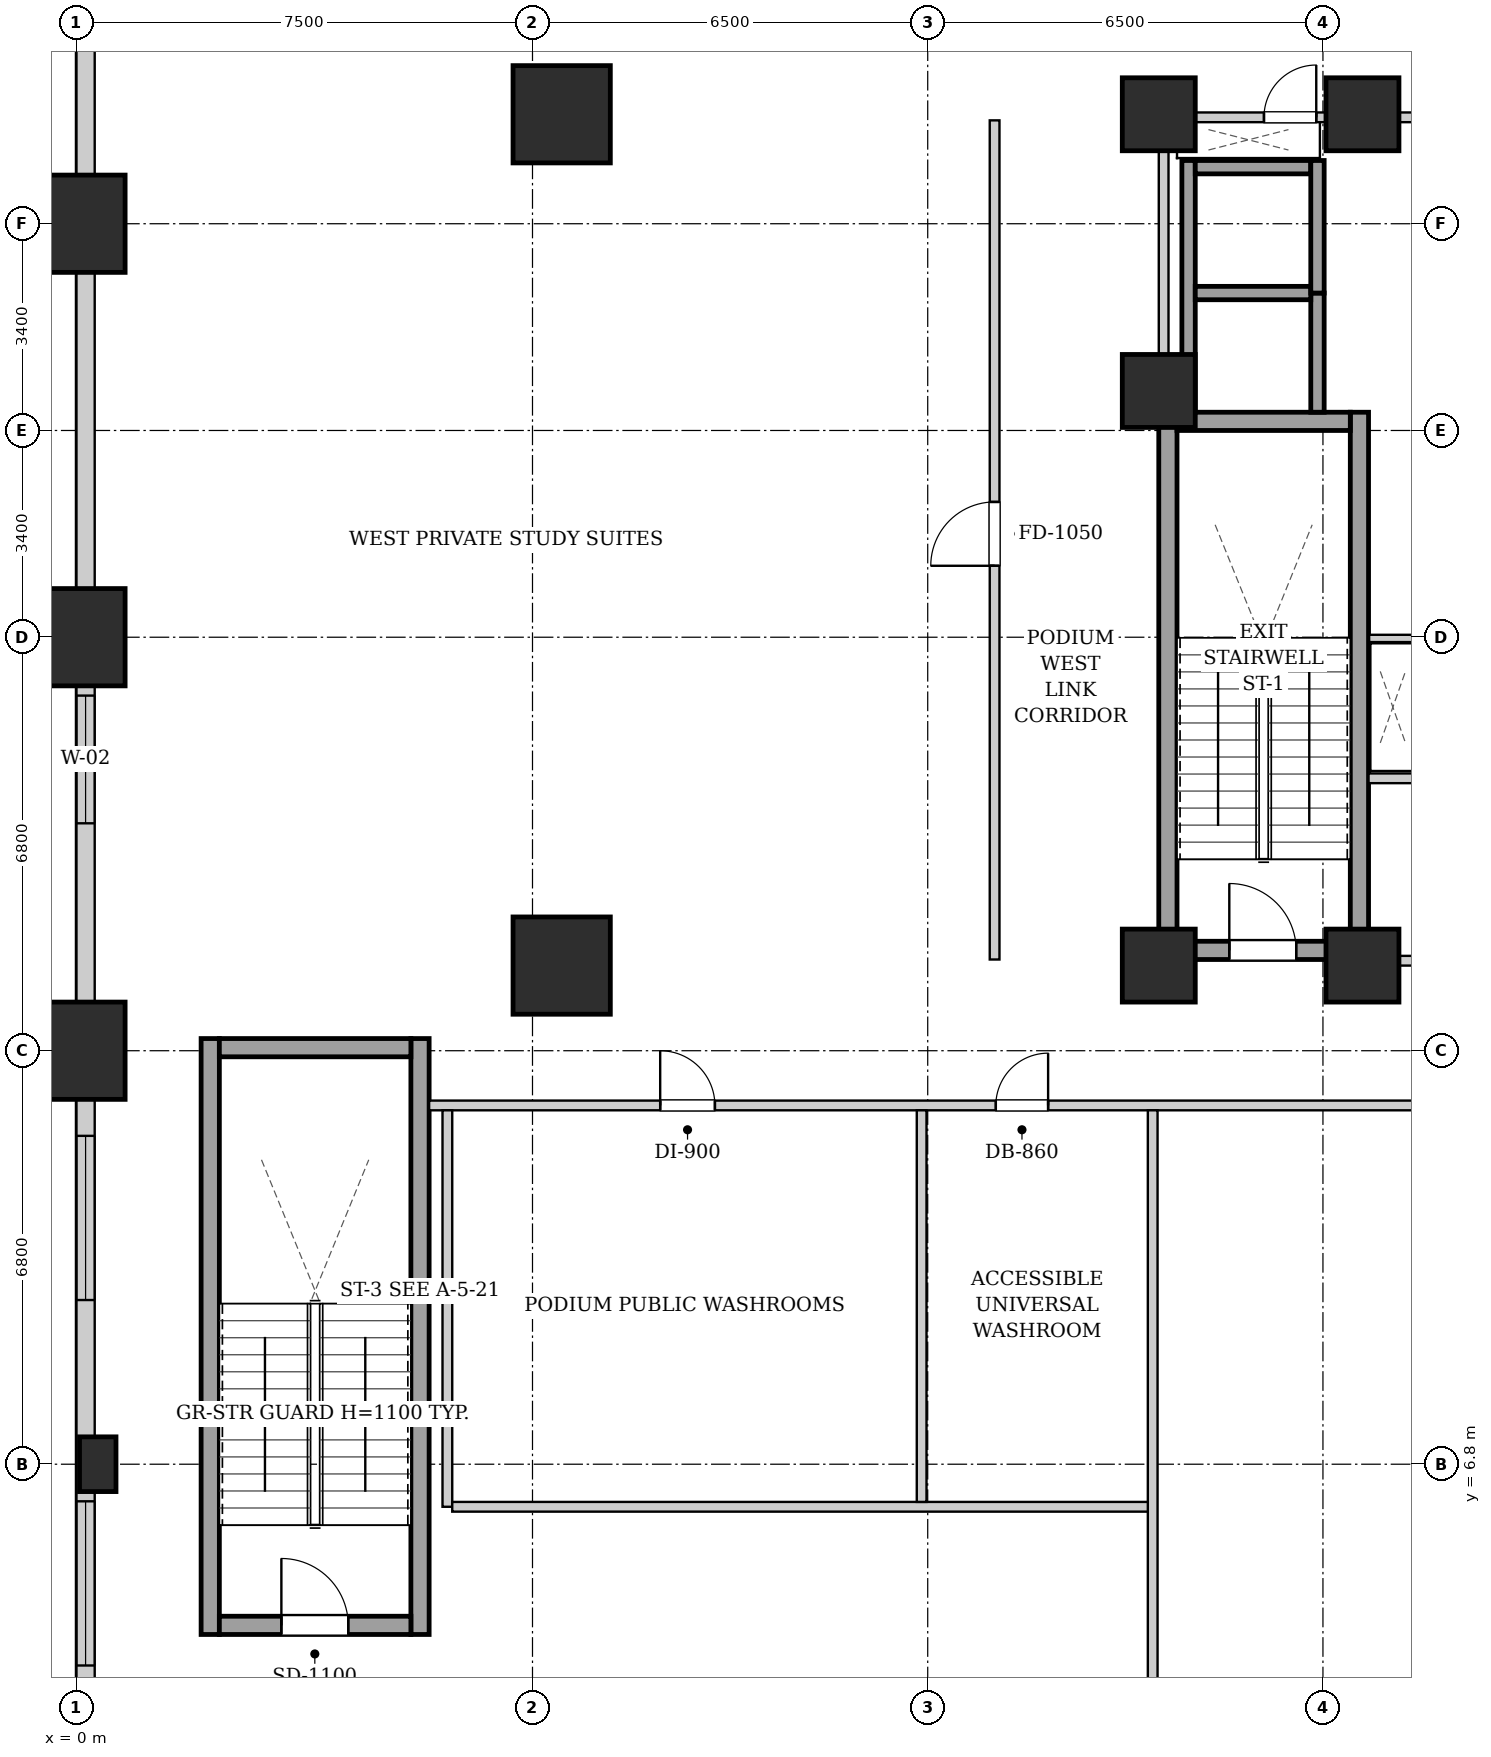
"""IFC4 building model, lengths in metres.
Left out: names, types, materials, properties, quantities, classifications, styles, units other than length and angle.
Written with IfcOpenShell. Run it as: python <this file> out.ifc"""

import sys

from ifc_helpers import new_model, si_unit, direction, frame, frame_2d, origin, origin_2d, place, context, subcontext, project, spatial, rectangle, extrude, element, fill, save


model = new_model("IFC4")
c1 = context("Model", 3, precision=1e-05, world=origin(), true_north=direction((0.0, 1.0)))
c2 = subcontext(c1, "Body", "Model", "MODEL_VIEW")
j1 = project(units=[si_unit("LENGTHUNIT", "METRE"), si_unit("PLANEANGLEUNIT", "RADIAN")], contexts=[c1])
p1 = place(None, origin())
s1 = spatial("IfcSite", under=j1, at=p1, CompositionType="ELEMENT")
p2 = place(p1, origin())
s2 = spatial("IfcBuilding", under=s1, at=p2, CompositionType="ELEMENT")
p3 = place(p2, frame((0.0, 0.0, 11.2)))
s3 = spatial("IfcBuildingStorey", under=s2, at=p3, CompositionType="ELEMENT", Elevation=11.2)
for number, where, z_axis, x_axis in (
    (1, (0.0, 13.6, 0.0), (0.0, 0.0, 1.0), (1.0, 0.0, 0.0)),
    (2, (0.0, 20.4, 0.0), (0.0, 0.0, 1.0), (1.0, 0.0, 0.0)),
    (3, (0.0, 27.2, 0.0), (0.0, 0.0, 1.0), (1.0, 0.0, 0.0)),
    (4, (7.98, 15.0, 0.0), (0.0, 0.0, 1.0), (1.0, 0.0, 0.0)),
    (5, (7.98, 29.0, 0.0), (0.0, 0.0, 1.0), (1.0, 0.0, 0.0)),
):
    element("IfcColumn", number, at=place(p3, frame(where, z_axis=z_axis, x_axis=x_axis)), inside=s3, PredefinedType="COLUMN", context=c2, shape_type="SweptSolid", body=[
        extrude(rectangle(XDim=1.6, YDim=1.6, at=origin_2d()), origin(), (0.0, 0.0, 1.0), 4.8),
    ])
for number, where, z_axis, x_axis in (
    (6, (17.8, 15.0, 0.0), (0.0, 0.0, 1.0), (1.0, 0.0, 0.0)),
    (7, (21.15, 15.0, 0.0), (0.0, 0.0, 1.0), (1.0, 0.0, 0.0)),
    (8, (17.8, 29.0, 0.0), (0.0, 0.0, 1.0), (1.0, 0.0, 0.0)),
    (9, (21.15, 29.0, 0.0), (0.0, 0.0, 1.0), (1.0, 0.0, 0.0)),
    (10, (17.8, 24.45, 0.0), (0.0, 0.0, 1.0), (1.0, 0.0, 0.0)),
):
    element("IfcColumn", number, at=place(p3, frame(where, z_axis=z_axis, x_axis=x_axis)), inside=s3, PredefinedType="COLUMN", context=c2, shape_type="SweptSolid", body=[
        extrude(rectangle(XDim=1.2, YDim=1.2, at=origin_2d()), origin(), (0.0, 0.0, 1.0), 4.8),
    ])
p4 = place(p3, frame((0.35, 6.8, 0.0), z_axis=(0.0, 0.0, 1.0), x_axis=(1.0, 0.0, 0.0)))
e11 = element("IfcColumn", 11, at=p4, inside=s3, PredefinedType="PILASTER", context=c2, shape_type="SweptSolid", body=[
    extrude(rectangle(XDim=0.6, YDim=0.9, at=origin_2d()), origin(), (0.0, 0.0, 1.0), 4.8),
])
p5 = place(p3, frame((0.15, 0.16, 0.0), z_axis=(0.0, 0.0, 1.0), x_axis=(0.0, 1.0, 0.0)))
e12 = element("IfcWall", 12, at=p5, inside=s3, PredefinedType="SOLIDWALL", context=c2, shape_type="SweptSolid", body=[
    extrude(rectangle(XDim=47.28, YDim=0.3, at=frame_2d((23.64, 0.0))), origin(), (0.0, 0.0, 1.0), 3.365),
])
p6 = place(p5, frame((3.33, 0.0, 0.9)))
e13 = element("IfcOpeningElement", 13, at=p6, cuts=e12, PredefinedType="OPENING", context=c2, shape_type="SweptSolid", body=[
    extrude(rectangle(XDim=2.7, YDim=2.1, at=frame_2d((1.35, 1.05))), frame((0.0, 0.16, 0.0), z_axis=(0.0, -1.0, 0.0), x_axis=(1.0, 0.0, 0.0)), (0.0, 0.0, 1.0), 0.32),
])
p7 = place(p5, frame((9.34, 0.0, 0.9)))
e14 = element("IfcOpeningElement", 14, at=p7, cuts=e12, PredefinedType="OPENING", context=c2, shape_type="SweptSolid", body=[
    extrude(rectangle(XDim=2.7, YDim=2.1, at=frame_2d((1.35, 1.05))), frame((0.0, 0.16, 0.0), z_axis=(0.0, -1.0, 0.0), x_axis=(1.0, 0.0, 0.0)), (0.0, 0.0, 1.0), 0.32),
])
p8 = place(p5, frame((17.18, 0.0, 0.85)))
e15 = element("IfcOpeningElement", 15, at=p8, cuts=e12, PredefinedType="OPENING", context=c2, shape_type="SweptSolid", body=[
    extrude(rectangle(XDim=2.1, YDim=1.85, at=frame_2d((1.05, 0.925))), frame((0.0, 0.16, 0.0), z_axis=(0.0, -1.0, 0.0), x_axis=(1.0, 0.0, 0.0)), (0.0, 0.0, 1.0), 0.32),
])
p9 = place(p5, frame((36.5, 0.0, 0.9)))
e16 = element("IfcOpeningElement", 16, at=p9, cuts=e12, PredefinedType="OPENING", context=c2, shape_type="SweptSolid", body=[
    extrude(rectangle(XDim=2.7, YDim=2.1, at=frame_2d((1.35, 1.05))), frame((0.0, 0.16, 0.0), z_axis=(0.0, -1.0, 0.0), x_axis=(1.0, 0.0, 0.0)), (0.0, 0.0, 1.0), 0.32),
])
p10 = place(p5, frame((43.0, 0.0, 0.9)))
e17 = element("IfcOpeningElement", 17, at=p10, cuts=e12, PredefinedType="OPENING", context=c2, shape_type="SweptSolid", body=[
    extrude(rectangle(XDim=2.7, YDim=2.1, at=frame_2d((1.35, 1.05))), frame((0.0, 0.16, 0.0), z_axis=(0.0, -1.0, 0.0), x_axis=(1.0, 0.0, 0.0)), (0.0, 0.0, 1.0), 0.32),
])
for number, where, z_axis, x_axis in (
    (18, (17.95, 15.1, 0.0), (0.0, 0.0, 1.0), (0.0, 1.0, 0.0)),
    (19, (21.1, 15.1, 0.0), (0.0, 0.0, 1.0), (0.0, 1.0, 0.0)),
):
    element("IfcWall", number, at=place(p3, frame(where, z_axis=z_axis, x_axis=x_axis)), inside=s3, PredefinedType="SHEAR", context=c2, shape_type="SweptSolid", body=[
        extrude(rectangle(XDim=9.0, YDim=0.3, at=frame_2d((4.5, 0.0))), origin(), (0.0, 0.0, 1.0), 4.48),
    ])
p11 = place(p3, frame((18.1, 23.95, 0.0), z_axis=(0.0, 0.0, 1.0), x_axis=(1.0, 0.0, 0.0)))
e20 = element("IfcWall", 20, at=p11, inside=s3, PredefinedType="SHEAR", context=c2, shape_type="SweptSolid", body=[
    extrude(rectangle(XDim=2.85, YDim=0.3, at=frame_2d((1.425, 0.0))), origin(), (0.0, 0.0, 1.0), 4.48),
])
p12 = place(p3, frame((18.1, 15.25, 0.0), z_axis=(0.0, 0.0, 1.0), x_axis=(1.0, 0.0, 0.0)))
e21 = element("IfcWall", 21, at=p12, inside=s3, PredefinedType="SHEAR", context=c2, shape_type="SweptSolid", body=[
    extrude(rectangle(XDim=2.85, YDim=0.3, at=frame_2d((1.425, 0.0))), origin(), (0.0, 0.0, 1.0), 4.48),
])
p13 = place(p12, frame((0.86, 0.0, 0.0)))
e22 = element("IfcOpeningElement", 22, at=p13, cuts=e21, PredefinedType="OPENING", context=c2, shape_type="SweptSolid", body=[
    extrude(rectangle(XDim=1.1, YDim=2.05, at=frame_2d((0.55, 1.025))), frame((0.0, 0.16, 0.0), z_axis=(0.0, -1.0, 0.0), x_axis=(1.0, 0.0, 0.0)), (0.0, 0.0, 1.0), 0.32),
])
for number, where, z_axis, x_axis in (
    (23, (2.2, 4.0, 0.0), (0.0, 0.0, 1.0), (0.0, 1.0, 0.0)),
    (24, (5.65, 4.0, 0.0), (0.0, 0.0, 1.0), (0.0, 1.0, 0.0)),
):
    element("IfcWall", number, at=place(p3, frame(where, z_axis=z_axis, x_axis=x_axis)), inside=s3, PredefinedType="SHEAR", context=c2, shape_type="SweptSolid", body=[
        extrude(rectangle(XDim=9.8, YDim=0.3, at=frame_2d((4.9, 0.0))), origin(), (0.0, 0.0, 1.0), 4.48),
    ])
p14 = place(p3, frame((2.35, 13.65, 0.0), z_axis=(0.0, 0.0, 1.0), x_axis=(1.0, 0.0, 0.0)))
e25 = element("IfcWall", 25, at=p14, inside=s3, PredefinedType="SHEAR", context=c2, shape_type="SweptSolid", body=[
    extrude(rectangle(XDim=3.15, YDim=0.3, at=frame_2d((1.575, 0.0))), origin(), (0.0, 0.0, 1.0), 4.48),
])
p15 = place(p3, frame((2.35, 4.15, 0.0), z_axis=(0.0, 0.0, 1.0), x_axis=(1.0, 0.0, 0.0)))
e26 = element("IfcWall", 26, at=p15, inside=s3, PredefinedType="SHEAR", context=c2, shape_type="SweptSolid", body=[
    extrude(rectangle(XDim=3.15, YDim=0.3, at=frame_2d((1.575, 0.0))), origin(), (0.0, 0.0, 1.0), 4.48),
])
p16 = place(p15, frame((1.02, 0.0, 0.0)))
e27 = element("IfcOpeningElement", 27, at=p16, cuts=e26, PredefinedType="OPENING", context=c2, shape_type="SweptSolid", body=[
    extrude(rectangle(XDim=1.1, YDim=2.05, at=frame_2d((0.55, 1.025))), frame((0.0, 0.16, 0.0), z_axis=(0.0, -1.0, 0.0), x_axis=(1.0, 0.0, 0.0)), (0.0, 0.0, 1.0), 0.32),
])
p17 = place(p3, frame((18.29, 24.1, 0.0), z_axis=(0.0, 0.0, 1.0), x_axis=(0.0, 1.0, 0.0)))
e28 = element("IfcWall", 28, at=p17, inside=s3, PredefinedType="SHEAR", context=c2, shape_type="SweptSolid", body=[
    extrude(rectangle(XDim=4.14, YDim=0.22, at=frame_2d((2.07, 0.0))), origin(), (0.0, 0.0, 1.0), 4.48),
])
p18 = place(p3, frame((20.41, 24.1, 0.0), z_axis=(0.0, 0.0, 1.0), x_axis=(0.0, 1.0, 0.0)))
e29 = element("IfcWall", 29, at=p18, inside=s3, PredefinedType="SHEAR", context=c2, shape_type="SweptSolid", body=[
    extrude(rectangle(XDim=1.96, YDim=0.22, at=frame_2d((0.98, 0.0))), origin(), (0.0, 0.0, 1.0), 4.48),
])
for number, where, z_axis, x_axis in (
    (30, (18.4, 26.06, 0.0), (0.0, 0.0, 1.0), (1.0, 0.0, 0.0)),
    (31, (18.4, 28.13, 0.0), (0.0, 0.0, 1.0), (1.0, 0.0, 0.0)),
):
    element("IfcWall", number, at=place(p3, frame(where, z_axis=z_axis, x_axis=x_axis)), inside=s3, PredefinedType="SHEAR", context=c2, shape_type="SweptSolid", body=[
        extrude(rectangle(XDim=1.9, YDim=0.22, at=frame_2d((0.95, 0.0))), origin(), (0.0, 0.0, 1.0), 4.48),
    ])
p19 = place(p3, frame((20.41, 26.06, 0.0), z_axis=(0.0, 0.0, 1.0), x_axis=(0.0, 1.0, 0.0)))
e32 = element("IfcWall", 32, at=p19, inside=s3, PredefinedType="SHEAR", context=c2, shape_type="SweptSolid", body=[
    extrude(rectangle(XDim=2.18, YDim=0.22, at=frame_2d((1.09, 0.0))), origin(), (0.0, 0.0, 1.0), 4.48),
])
p20 = place(p3, frame((21.25, 15.08, 0.0), z_axis=(0.0, 0.0, 1.0), x_axis=(1.0, 0.0, 0.0)))
e33 = element("IfcWall", 33, at=p20, inside=s3, PredefinedType="PARTITIONING", context=c2, shape_type="SweptSolid", body=[
    extrude(rectangle(XDim=8.5, YDim=0.16, at=frame_2d((4.25, 0.0))), origin(), (0.0, 0.0, 1.0), 4.48),
])
p21 = place(p20, frame((3.725, 0.0, 0.0)))
e34 = element("IfcOpeningElement", 34, at=p21, cuts=e33, PredefinedType="OPENING", context=c2, shape_type="SweptSolid", body=[
    extrude(rectangle(XDim=1.05, YDim=2.05, at=frame_2d((0.525, 1.025))), frame((0.0, 0.09, 0.0), z_axis=(0.0, -1.0, 0.0), x_axis=(1.0, 0.0, 0.0)), (0.0, 0.0, 1.0), 0.18),
])
p22 = place(p3, frame((21.25, 18.08, 0.0), z_axis=(0.0, 0.0, 1.0), x_axis=(1.0, 0.0, 0.0)))
e35 = element("IfcWall", 35, at=p22, inside=s3, PredefinedType="PARTITIONING", context=c2, shape_type="SweptSolid", body=[
    extrude(rectangle(XDim=1.1, YDim=0.16, at=frame_2d((0.55, 0.0))), origin(), (0.0, 0.0, 1.0), 4.48),
])
p23 = place(p3, frame((17.88, 24.12, 0.0), z_axis=(0.0, 0.0, 1.0), x_axis=(0.0, 1.0, 0.0)))
e36 = element("IfcWall", 36, at=p23, inside=s3, PredefinedType="PARTITIONING", context=c2, shape_type="SweptSolid", body=[
    extrude(rectangle(XDim=4.76, YDim=0.16, at=frame_2d((2.38, 0.0))), origin(), (0.0, 0.0, 1.0), 4.48),
])
p24 = place(p3, frame((17.96, 28.95, 0.0), z_axis=(0.0, 0.0, 1.0), x_axis=(1.0, 0.0, 0.0)))
e37 = element("IfcWall", 37, at=p24, inside=s3, PredefinedType="PARTITIONING", context=c2, shape_type="SweptSolid", body=[
    extrude(rectangle(XDim=4.29, YDim=0.16, at=frame_2d((2.145, 0.0))), origin(), (0.0, 0.0, 1.0), 4.48),
])
p25 = place(p24, frame((1.57, 0.0, 0.0)))
e38 = element("IfcOpeningElement", 38, at=p25, cuts=e37, PredefinedType="OPENING", context=c2, shape_type="SweptSolid", body=[
    extrude(rectangle(XDim=0.86, YDim=2.05, at=frame_2d((0.43, 1.025))), frame((0.0, 0.09, 0.0), z_axis=(0.0, -1.0, 0.0), x_axis=(1.0, 0.0, 0.0)), (0.0, 0.0, 1.0), 0.18),
])
p26 = place(p3, frame((22.28, 20.38, 0.0), z_axis=(0.0, 0.0, 1.0), x_axis=(-1.0, 0.0, 0.0)))
e39 = element("IfcWall", 39, at=p26, inside=s3, PredefinedType="PARTITIONING", context=c2, shape_type="SweptSolid", body=[
    extrude(rectangle(XDim=1.02, YDim=0.12, at=frame_2d((0.51, 0.0))), origin(), (0.0, 0.0, 1.0), 4.48),
])
p27 = place(p3, frame((5.8, 12.7, 0.0), z_axis=(0.0, 0.0, 1.0), x_axis=(1.0, 0.0, 0.0)))
e40 = element("IfcWall", 40, at=p27, inside=s3, PredefinedType="PARTITIONING", context=c2, shape_type="SweptSolid", body=[
    extrude(rectangle(XDim=47.92, YDim=0.16, at=frame_2d((23.96, 0.0))), origin(), (0.0, 0.0, 1.0), 4.48),
])
p28 = place(p27, frame((3.8, 0.0, 0.0)))
e41 = element("IfcOpeningElement", 41, at=p28, cuts=e40, PredefinedType="OPENING", context=c2, shape_type="SweptSolid", body=[
    extrude(rectangle(XDim=0.9, YDim=2.05, at=frame_2d((0.45, 1.025))), frame((0.0, 0.09, 0.0), z_axis=(0.0, -1.0, 0.0), x_axis=(1.0, 0.0, 0.0)), (0.0, 0.0, 1.0), 0.18),
])
p29 = place(p27, frame((9.32, 0.0, 0.0)))
e42 = element("IfcOpeningElement", 42, at=p29, cuts=e40, PredefinedType="OPENING", context=c2, shape_type="SweptSolid", body=[
    extrude(rectangle(XDim=0.86, YDim=2.05, at=frame_2d((0.43, 1.025))), frame((0.0, 0.09, 0.0), z_axis=(0.0, -1.0, 0.0), x_axis=(1.0, 0.0, 0.0)), (0.0, 0.0, 1.0), 0.18),
])
p30 = place(p27, frame((18.975, 0.0, 0.0)))
e43 = element("IfcOpeningElement", 43, at=p30, cuts=e40, PredefinedType="OPENING", context=c2, shape_type="SweptSolid", body=[
    extrude(rectangle(XDim=1.05, YDim=2.05, at=frame_2d((0.525, 1.025))), frame((0.0, 0.09, 0.0), z_axis=(0.0, -1.0, 0.0), x_axis=(1.0, 0.0, 0.0)), (0.0, 0.0, 1.0), 0.18),
])
p31 = place(p27, frame((35.725, 0.0, 0.0)))
e44 = element("IfcOpeningElement", 44, at=p31, cuts=e40, PredefinedType="OPENING", context=c2, shape_type="SweptSolid", body=[
    extrude(rectangle(XDim=1.05, YDim=2.05, at=frame_2d((0.525, 1.025))), frame((0.0, 0.09, 0.0), z_axis=(0.0, -1.0, 0.0), x_axis=(1.0, 0.0, 0.0)), (0.0, 0.0, 1.0), 0.18),
])
p32 = place(p3, frame((6.1, 6.1, 0.0), z_axis=(0.0, 0.0, 1.0), x_axis=(0.0, 1.0, 0.0)))
e45 = element("IfcWall", 45, at=p32, inside=s3, PredefinedType="PARTITIONING", context=c2, shape_type="SweptSolid", body=[
    extrude(rectangle(XDim=6.52, YDim=0.16, at=frame_2d((3.26, 0.0))), origin(), (0.0, 0.0, 1.0), 4.48),
])
p33 = place(p3, frame((6.18, 6.1, 0.0), z_axis=(0.0, 0.0, 1.0), x_axis=(1.0, 0.0, 0.0)))
e46 = element("IfcWall", 46, at=p33, inside=s3, PredefinedType="PARTITIONING", context=c2, shape_type="SweptSolid", body=[
    extrude(rectangle(XDim=11.5, YDim=0.16, at=frame_2d((5.75, 0.0))), origin(), (0.0, 0.0, 1.0), 4.48),
])
p34 = place(p3, frame((13.9, 6.18, 0.0), z_axis=(0.0, 0.0, 1.0), x_axis=(0.0, 1.0, 0.0)))
e47 = element("IfcWall", 47, at=p34, inside=s3, PredefinedType="PARTITIONING", context=c2, shape_type="SweptSolid", body=[
    extrude(rectangle(XDim=6.44, YDim=0.16, at=frame_2d((3.22, 0.0))), origin(), (0.0, 0.0, 1.0), 4.48),
])
p35 = place(p3, frame((17.7, 0.6, 0.0), z_axis=(0.0, 0.0, 1.0), x_axis=(0.0, 1.0, 0.0)))
e48 = element("IfcWall", 48, at=p35, inside=s3, PredefinedType="PARTITIONING", context=c2, shape_type="SweptSolid", body=[
    extrude(rectangle(XDim=12.02, YDim=0.16, at=frame_2d((6.01, 0.0))), origin(), (0.0, 0.0, 1.0), 3.565),
])
p36 = place(p3, frame((15.1, 15.1, 0.0), z_axis=(0.0, 0.0, 1.0), x_axis=(0.0, 1.0, 0.0)))
e49 = element("IfcWall", 49, at=p36, inside=s3, PredefinedType="PARTITIONING", context=c2, shape_type="SweptSolid", body=[
    extrude(rectangle(XDim=13.8, YDim=0.16, at=frame_2d((6.9, 0.0))), origin(), (0.0, 0.0, 1.0), 4.48),
])
p37 = place(p36, frame((6.475, 0.0, 0.0)))
e50 = element("IfcOpeningElement", 50, at=p37, cuts=e49, PredefinedType="OPENING", context=c2, shape_type="SweptSolid", body=[
    extrude(rectangle(XDim=1.05, YDim=2.05, at=frame_2d((0.525, 1.025))), frame((0.0, 0.09, 0.0), z_axis=(0.0, -1.0, 0.0), x_axis=(1.0, 0.0, 0.0)), (0.0, 0.0, 1.0), 0.18),
])
p38 = place(p13, origin())
e51 = element("IfcDoor", 51, at=p38, inside=s3, OperationType="SINGLE_SWING_LEFT", PredefinedType="DOOR", context=c2, shape_type="SweptSolid", body=[
    extrude(rectangle(XDim=1.1, YDim=2.05, at=frame_2d((0.55, 1.025))), frame((0.0, 0.025, 0.0), z_axis=(0.0, -1.0, 0.0), x_axis=(1.0, 0.0, 0.0)), (0.0, 0.0, 1.0), 0.05),
])
fill(e22, e51)
p39 = place(p16, origin())
e52 = element("IfcDoor", 52, at=p39, inside=s3, OperationType="SINGLE_SWING_LEFT", PredefinedType="DOOR", context=c2, shape_type="SweptSolid", body=[
    extrude(rectangle(XDim=1.1, YDim=2.05, at=frame_2d((0.55, 1.025))), frame((0.0, 0.025, 0.0), z_axis=(0.0, -1.0, 0.0), x_axis=(1.0, 0.0, 0.0)), (0.0, 0.0, 1.0), 0.05),
])
fill(e27, e52)
p40 = place(p25, origin())
e53 = element("IfcDoor", 53, at=p40, inside=s3, OperationType="SINGLE_SWING_RIGHT", PredefinedType="DOOR", context=c2, shape_type="SweptSolid", body=[
    extrude(rectangle(XDim=0.86, YDim=2.05, at=frame_2d((0.43, 1.025))), frame((0.0, 0.025, 0.0), z_axis=(0.0, -1.0, 0.0), x_axis=(1.0, 0.0, 0.0)), (0.0, 0.0, 1.0), 0.05),
])
fill(e38, e53)
p41 = place(p28, origin())
e54 = element("IfcDoor", 54, at=p41, inside=s3, OperationType="SINGLE_SWING_LEFT", PredefinedType="DOOR", context=c2, shape_type="SweptSolid", body=[
    extrude(rectangle(XDim=0.9, YDim=2.05, at=frame_2d((0.45, 1.025))), frame((0.0, 0.025, 0.0), z_axis=(0.0, -1.0, 0.0), x_axis=(1.0, 0.0, 0.0)), (0.0, 0.0, 1.0), 0.05),
])
fill(e41, e54)
p42 = place(p29, origin())
e55 = element("IfcDoor", 55, at=p42, inside=s3, OperationType="SINGLE_SWING_RIGHT", PredefinedType="DOOR", context=c2, shape_type="SweptSolid", body=[
    extrude(rectangle(XDim=0.86, YDim=2.05, at=frame_2d((0.43, 1.025))), frame((0.0, 0.025, 0.0), z_axis=(0.0, -1.0, 0.0), x_axis=(1.0, 0.0, 0.0)), (0.0, 0.0, 1.0), 0.05),
])
fill(e42, e55)
p43 = place(p37, origin())
e56 = element("IfcDoor", 56, at=p43, inside=s3, OperationType="SINGLE_SWING_LEFT", PredefinedType="DOOR", context=c2, shape_type="SweptSolid", body=[
    extrude(rectangle(XDim=1.05, YDim=2.05, at=frame_2d((0.525, 1.025))), frame((0.0, 0.025, 0.0), z_axis=(0.0, -1.0, 0.0), x_axis=(1.0, 0.0, 0.0)), (0.0, 0.0, 1.0), 0.05),
])
fill(e50, e56)
p44 = place(p6, origin())
e57 = element("IfcWindow", 57, at=p44, inside=s3, PartitioningType="TRIPLE_PANEL_VERTICAL", PredefinedType="WINDOW", context=c2, shape_type="SweptSolid", body=[
    extrude(rectangle(XDim=2.7, YDim=2.1, at=frame_2d((1.35, 1.05))), frame((0.0, 0.03, 0.0), z_axis=(0.0, -1.0, 0.0), x_axis=(1.0, 0.0, 0.0)), (0.0, 0.0, 1.0), 0.06),
])
fill(e13, e57)
p45 = place(p7, origin())
e58 = element("IfcWindow", 58, at=p45, inside=s3, PartitioningType="TRIPLE_PANEL_VERTICAL", PredefinedType="WINDOW", context=c2, shape_type="SweptSolid", body=[
    extrude(rectangle(XDim=2.7, YDim=2.1, at=frame_2d((1.35, 1.05))), frame((0.0, 0.03, 0.0), z_axis=(0.0, -1.0, 0.0), x_axis=(1.0, 0.0, 0.0)), (0.0, 0.0, 1.0), 0.06),
])
fill(e14, e58)
p46 = place(p8, origin())
e59 = element("IfcWindow", 59, at=p46, inside=s3, PartitioningType="DOUBLE_PANEL_VERTICAL", PredefinedType="WINDOW", context=c2, shape_type="SweptSolid", body=[
    extrude(rectangle(XDim=2.1, YDim=1.85, at=frame_2d((1.05, 0.925))), frame((0.0, 0.03, 0.0), z_axis=(0.0, -1.0, 0.0), x_axis=(1.0, 0.0, 0.0)), (0.0, 0.0, 1.0), 0.06),
])
fill(e15, e59)
save(model, sys.argv[1])
